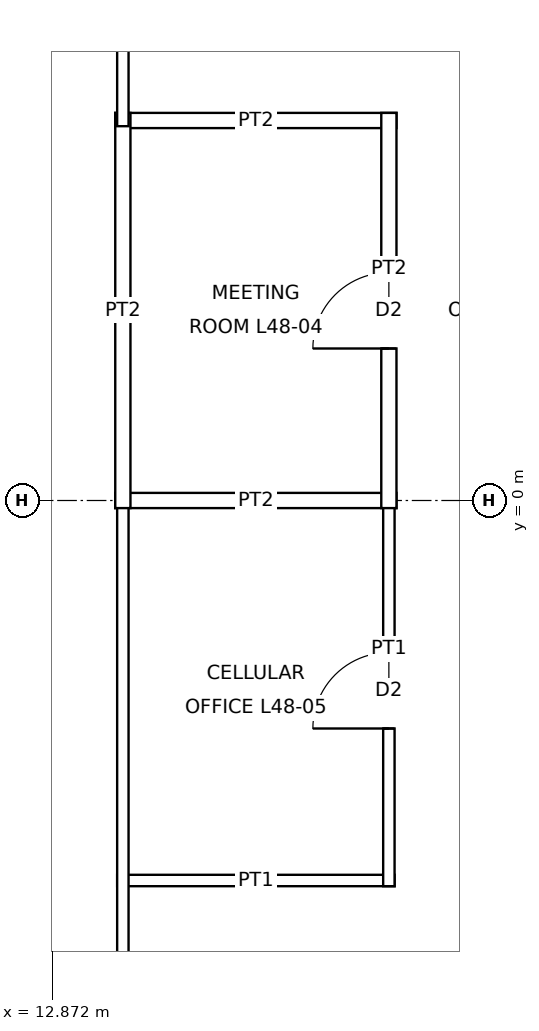
"""IFC4 building model, lengths in metres.
Left out: names, types, materials, properties, quantities, classifications, styles, units other than length and angle.
Written with IfcOpenShell. Run it as: python <this file> out.ifc"""

import sys

from ifc_helpers import new_model, si_unit, direction, frame, frame_2d, origin, place, context, subcontext, project, spatial, rectangle, extrude, element, fill, save


model = new_model("IFC4")
c1 = context("Model", 3, precision=1e-05, world=origin(), true_north=direction((0.0, 1.0)))
c2 = subcontext(c1, "Body", "Model", "MODEL_VIEW")
j1 = project(units=[si_unit("LENGTHUNIT", "METRE"), si_unit("PLANEANGLEUNIT", "RADIAN")], contexts=[c1])
p1 = place(None, origin())
s1 = spatial("IfcSite", under=j1, at=p1, CompositionType="ELEMENT")
p2 = place(p1, origin())
s2 = spatial("IfcBuilding", under=s1, at=p2, CompositionType="ELEMENT")
p3 = place(p2, frame((0.0, 0.0, 225.9)))
s3 = spatial("IfcBuildingStorey", under=s2, at=p3, CompositionType="ELEMENT", Elevation=225.9)
p4 = place(p3, frame((13.725, -5.0, 0.0), z_axis=(0.0, 0.0, 1.0), x_axis=(1.0, 0.0, 0.0)))
e1 = element("IfcWall", 1, at=p4, inside=s3, PredefinedType="PARTITIONING", context=c2, shape_type="SweptSolid", body=[
    extrude(rectangle(XDim=3.65, YDim=0.15, at=frame_2d((1.825, 0.0))), origin(), (0.0, 0.0, 1.0), 3.85),
])
p5 = place(p3, frame((13.7, 0.0, 0.0), z_axis=(0.0, 0.0, 1.0), x_axis=(1.0, 0.0, 0.0)))
e2 = element("IfcWall", 2, at=p5, inside=s3, PredefinedType="PARTITIONING", context=c2, shape_type="SweptSolid", body=[
    extrude(rectangle(XDim=3.7, YDim=0.2, at=frame_2d((1.85, 0.0))), origin(), (0.0, 0.0, 1.0), 3.238),
])
p6 = place(p3, frame((13.7, 5.0, 0.0), z_axis=(0.0, 0.0, 1.0), x_axis=(1.0, 0.0, 0.0)))
e3 = element("IfcWall", 3, at=p6, inside=s3, PredefinedType="PARTITIONING", context=c2, shape_type="SweptSolid", body=[
    extrude(rectangle(XDim=3.7, YDim=0.2, at=frame_2d((1.85, 0.0))), origin(), (0.0, 0.0, 1.0), 3.85),
])
p7 = place(p3, frame((13.8, -13.875, 0.0), z_axis=(0.0, 0.0, 1.0), x_axis=(0.0, 1.0, 0.0)))
e4 = element("IfcWall", 4, at=p7, inside=s3, PredefinedType="PARTITIONING", context=c2, shape_type="SweptSolid", body=[
    extrude(rectangle(XDim=13.95, YDim=0.15, at=frame_2d((6.975, 0.0))), origin(), (0.0, 0.0, 1.0), 3.85),
])
p8 = place(p3, frame((13.8, -0.1, 0.0), z_axis=(0.0, 0.0, 1.0), x_axis=(0.0, 1.0, 0.0)))
e5 = element("IfcWall", 5, at=p8, inside=s3, PredefinedType="PARTITIONING", context=c2, shape_type="SweptSolid", body=[
    extrude(rectangle(XDim=5.2, YDim=0.2, at=frame_2d((2.6, 0.0))), origin(), (0.0, 0.0, 1.0), 3.85),
])
p9 = place(p3, frame((13.8, 4.925, 0.0), z_axis=(0.0, 0.0, 1.0), x_axis=(0.0, 1.0, 0.0)))
e6 = element("IfcWall", 6, at=p9, inside=s3, PredefinedType="PARTITIONING", context=c2, shape_type="SweptSolid", body=[
    extrude(rectangle(XDim=7.15, YDim=0.15, at=frame_2d((3.575, 0.0))), origin(), (0.0, 0.0, 1.0), 3.85),
])
p10 = place(p3, frame((17.3, -5.075, 0.0), z_axis=(0.0, 0.0, 1.0), x_axis=(0.0, 1.0, 0.0)))
e7 = element("IfcWall", 7, at=p10, inside=s3, PredefinedType="PARTITIONING", context=c2, shape_type="SweptSolid", body=[
    extrude(rectangle(XDim=5.15, YDim=0.15, at=frame_2d((2.575, 0.0))), origin(), (0.0, 0.0, 1.0), 3.85),
])
p11 = place(p10, frame((2.075, 0.0, 0.0)))
e8 = element("IfcOpeningElement", 8, at=p11, cuts=e7, PredefinedType="OPENING", context=c2, shape_type="SweptSolid", body=[
    extrude(rectangle(XDim=1.0, YDim=2.1, at=frame_2d((0.5, 1.05))), frame((0.0, 0.085, 0.0), z_axis=(0.0, -1.0, 0.0), x_axis=(1.0, 0.0, 0.0)), (0.0, 0.0, 1.0), 0.17),
])
p12 = place(p3, frame((17.3, -0.1, 0.0), z_axis=(0.0, 0.0, 1.0), x_axis=(0.0, 1.0, 0.0)))
e9 = element("IfcWall", 9, at=p12, inside=s3, PredefinedType="PARTITIONING", context=c2, shape_type="SweptSolid", body=[
    extrude(rectangle(XDim=5.2, YDim=0.2, at=frame_2d((2.6, 0.0))), origin(), (0.0, 0.0, 1.0), 3.85),
])
p13 = place(p12, frame((2.1, 0.0, 0.0)))
e10 = element("IfcOpeningElement", 10, at=p13, cuts=e9, PredefinedType="OPENING", context=c2, shape_type="SweptSolid", body=[
    extrude(rectangle(XDim=1.0, YDim=2.1, at=frame_2d((0.5, 1.05))), frame((0.0, 0.11, 0.0), z_axis=(0.0, -1.0, 0.0), x_axis=(1.0, 0.0, 0.0)), (0.0, 0.0, 1.0), 0.22),
])
p14 = place(p13, origin())
e11 = element("IfcDoor", 11, at=p14, inside=s3, OperationType="SINGLE_SWING_LEFT", PredefinedType="DOOR", context=c2, shape_type="SweptSolid", body=[
    extrude(rectangle(XDim=1.0, YDim=2.1, at=frame_2d((0.5, 1.05))), frame((0.0, 0.025, 0.0), z_axis=(0.0, -1.0, 0.0), x_axis=(1.0, 0.0, 0.0)), (0.0, 0.0, 1.0), 0.05),
])
fill(e10, e11)
p15 = place(p11, origin())
e12 = element("IfcDoor", 12, at=p15, inside=s3, OperationType="SINGLE_SWING_LEFT", PredefinedType="DOOR", context=c2, shape_type="SweptSolid", body=[
    extrude(rectangle(XDim=1.0, YDim=2.1, at=frame_2d((0.5, 1.05))), frame((0.0, 0.025, 0.0), z_axis=(0.0, -1.0, 0.0), x_axis=(1.0, 0.0, 0.0)), (0.0, 0.0, 1.0), 0.05),
])
fill(e8, e12)
save(model, sys.argv[1])
